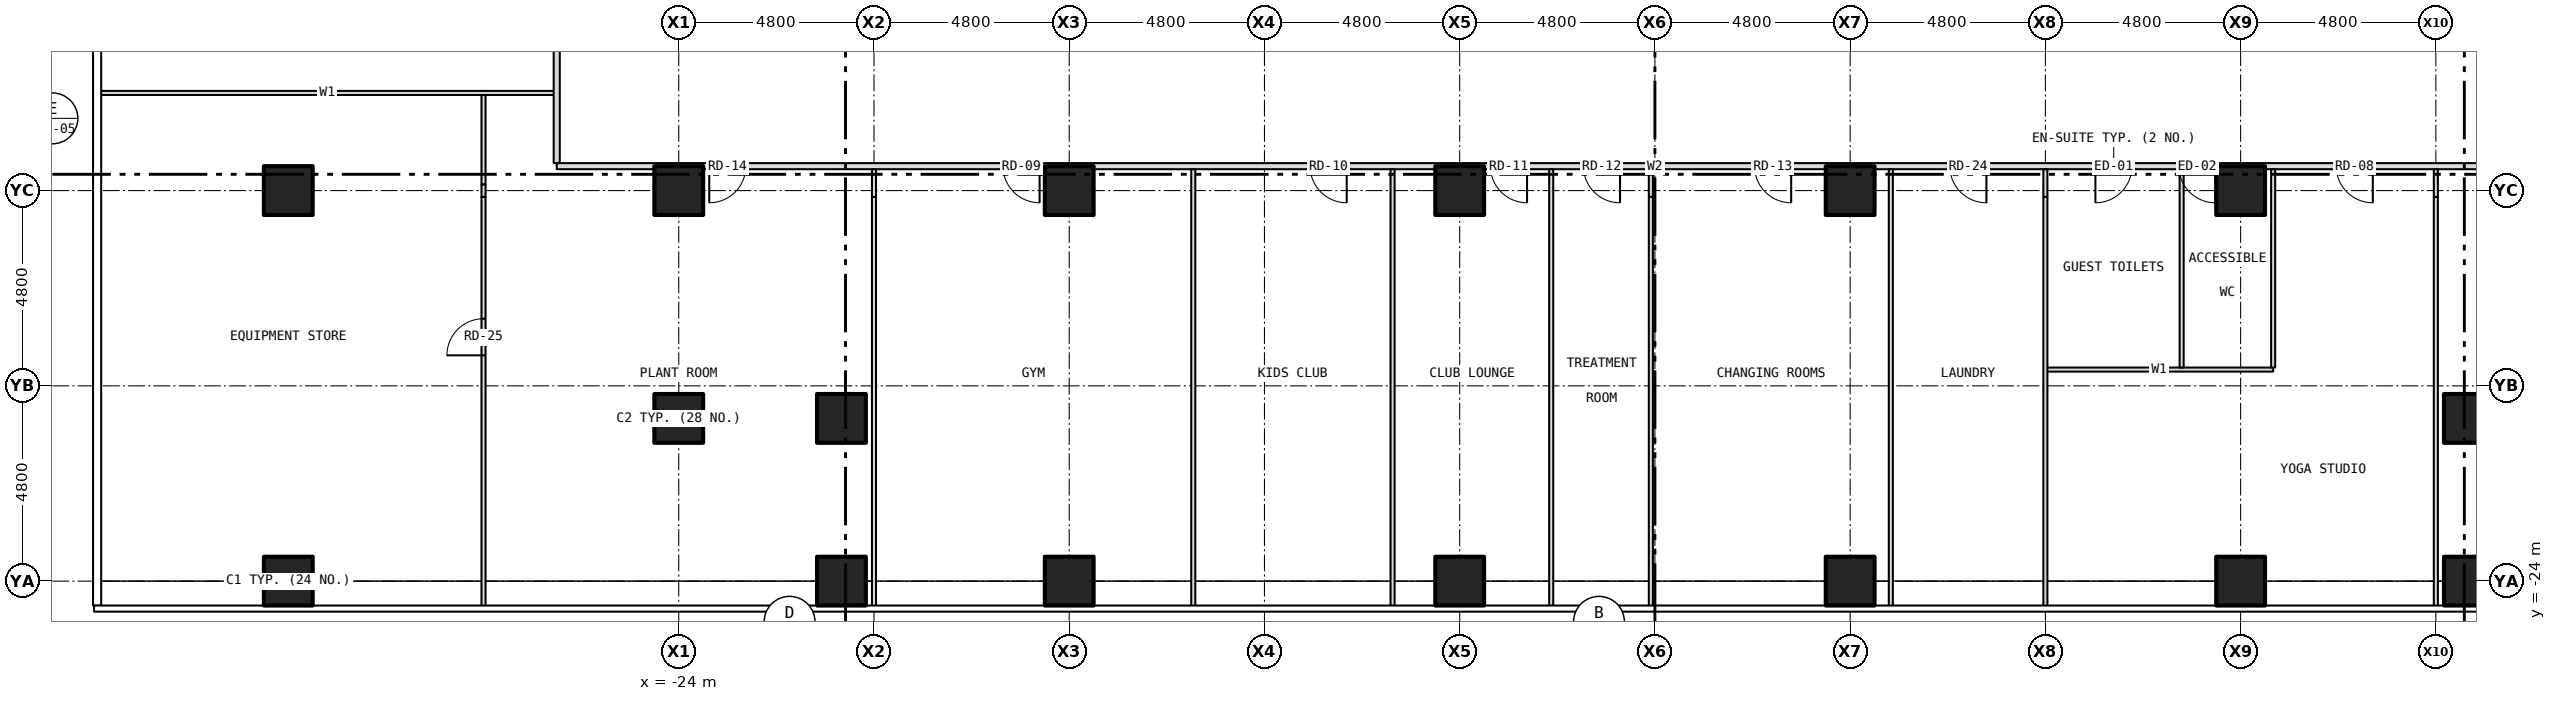
"""IFC4 building model, lengths in metres.
Left out: names, types, materials, properties, quantities, classifications, styles, units other than length and angle.
Written with IfcOpenShell. Run it as: python <this file> out.ifc"""

import sys

from ifc_helpers import new_model, si_unit, direction, frame, frame_2d, origin, origin_2d, place, context, subcontext, project, spatial, rectangle, hollow_rectangle, extrude, element, fill, save


model = new_model("IFC4")
c1 = context("Model", 3, precision=1e-05, world=origin(), true_north=direction((0.0, 1.0)))
c2 = subcontext(c1, "Body", "Model", "MODEL_VIEW")
j1 = project(units=[si_unit("LENGTHUNIT", "METRE"), si_unit("PLANEANGLEUNIT", "RADIAN")], contexts=[c1])
p1 = place(None, origin())
s1 = spatial("IfcSite", under=j1, at=p1, CompositionType="ELEMENT")
p2 = place(p1, origin())
s2 = spatial("IfcBuilding", under=s1, at=p2, CompositionType="ELEMENT")
p3 = place(p2, frame((0.0, 0.0, 24.5)))
s3 = spatial("IfcBuildingStorey", under=s2, at=p3, CompositionType="ELEMENT", Elevation=24.5)
for number, where, z_axis, x_axis in (
    (1, (-33.6, -24.0, -0.2), (0.0, 0.0, 1.0), (1.0, 0.0, 0.0)),
    (2, (-33.6, -14.4, -0.2), (0.0, 0.0, 1.0), (1.0, 0.0, 0.0)),
    (3, (-20.0, -24.0, -0.2), (0.0, 0.0, 1.0), (1.0, 0.0, 0.0)),
    (4, (-14.4, -24.0, -0.2), (0.0, 0.0, 1.0), (1.0, 0.0, 0.0)),
    (5, (-4.8, -24.0, -0.2), (0.0, 0.0, 1.0), (1.0, 0.0, 0.0)),
    (6, (4.8, -24.0, -0.2), (0.0, 0.0, 1.0), (1.0, 0.0, 0.0)),
    (7, (14.4, -24.0, -0.2), (0.0, 0.0, 1.0), (1.0, 0.0, 0.0)),
    (8, (20.0, -24.0, -0.2), (0.0, 0.0, 1.0), (1.0, 0.0, 0.0)),
    (9, (-24.0, -20.0, -0.2), (0.0, 0.0, 1.0), (1.0, 0.0, 0.0)),
    (10, (-24.0, -14.4, -0.2), (0.0, 0.0, 1.0), (1.0, 0.0, 0.0)),
    (11, (-20.0, -20.0, -0.2), (0.0, 0.0, 1.0), (1.0, 0.0, 0.0)),
    (12, (-14.4, -14.4, -0.2), (0.0, 0.0, 1.0), (1.0, 0.0, 0.0)),
    (13, (-4.8, -14.4, -0.2), (0.0, 0.0, 1.0), (1.0, 0.0, 0.0)),
    (14, (4.8, -14.4, -0.2), (0.0, 0.0, 1.0), (1.0, 0.0, 0.0)),
    (15, (14.4, -14.4, -0.2), (0.0, 0.0, 1.0), (1.0, 0.0, 0.0)),
    (16, (20.0, -20.0, -0.2), (0.0, 0.0, 1.0), (1.0, 0.0, 0.0)),
):
    element("IfcColumn", number, at=place(p3, frame(where, z_axis=z_axis, x_axis=x_axis)), inside=s3, PredefinedType="COLUMN", context=c2, shape_type="SweptSolid", body=[
        extrude(hollow_rectangle(XDim=1.2, YDim=1.2, WallThickness=0.07, at=origin_2d()), origin(), (0.0, 0.0, 1.0), 4.5),
    ])
p4 = place(p3, frame((9.6, -18.8, 0.0), z_axis=(0.0, 0.0, 1.0), x_axis=(1.0, 0.0, 0.0)))
e17 = element("IfcWall", 17, at=p4, inside=s3, PredefinedType="PARTITIONING", context=c2, shape_type="SweptSolid", body=[
    extrude(rectangle(XDim=5.6, YDim=0.1, at=frame_2d((2.8, 0.0))), origin(), (0.0, 0.0, 1.0), 4.3),
])
p5 = place(p3, frame((-27.0, -13.8, 0.0), z_axis=(0.0, 0.0, 1.0), x_axis=(1.0, 0.0, 0.0)))
e18 = element("IfcWall", 18, at=p5, inside=s3, PredefinedType="PARTITIONING", context=c2, shape_type="SweptSolid", body=[
    extrude(rectangle(XDim=54.0, YDim=0.15, at=frame_2d((27.0, 0.0))), origin(), (0.0, 0.0, 1.0), 4.3),
])
p6 = place(p5, frame((37.83, 0.0, 0.0)))
e19 = element("IfcOpeningElement", 19, at=p6, cuts=e18, PredefinedType="OPENING", context=c2, shape_type="SweptSolid", body=[
    extrude(rectangle(XDim=0.9, YDim=2.1, at=frame_2d((0.45, 1.05))), frame((0.0, 0.087, 0.0), z_axis=(0.0, -1.0, 0.0), x_axis=(1.0, 0.0, 0.0)), (0.0, 0.0, 1.0), 0.174),
])
p7 = place(p5, frame((39.88, 0.0, 0.0)))
e20 = element("IfcOpeningElement", 20, at=p7, cuts=e18, PredefinedType="OPENING", context=c2, shape_type="SweptSolid", body=[
    extrude(rectangle(XDim=0.9, YDim=2.1, at=frame_2d((0.45, 1.05))), frame((0.0, 0.087, 0.0), z_axis=(0.0, -1.0, 0.0), x_axis=(1.0, 0.0, 0.0)), (0.0, 0.0, 1.0), 0.174),
])
p8 = place(p5, frame((43.75, 0.0, 0.0)))
e21 = element("IfcOpeningElement", 21, at=p8, cuts=e18, PredefinedType="OPENING", context=c2, shape_type="SweptSolid", body=[
    extrude(rectangle(XDim=0.9, YDim=2.1, at=frame_2d((0.45, 1.05))), frame((0.0, 0.087, 0.0), z_axis=(0.0, -1.0, 0.0), x_axis=(1.0, 0.0, 0.0)), (0.0, 0.0, 1.0), 0.174),
])
p9 = place(p5, frame((10.972, 0.0, 0.0)))
e22 = element("IfcOpeningElement", 22, at=p9, cuts=e18, PredefinedType="OPENING", context=c2, shape_type="SweptSolid", body=[
    extrude(rectangle(XDim=0.9, YDim=2.1, at=frame_2d((0.45, 1.05))), frame((0.0, 0.087, 0.0), z_axis=(0.0, -1.0, 0.0), x_axis=(1.0, 0.0, 0.0)), (0.0, 0.0, 1.0), 0.174),
])
p10 = place(p5, frame((18.523, 0.0, 0.0)))
e23 = element("IfcOpeningElement", 23, at=p10, cuts=e18, PredefinedType="OPENING", context=c2, shape_type="SweptSolid", body=[
    extrude(rectangle(XDim=0.9, YDim=2.1, at=frame_2d((0.45, 1.05))), frame((0.0, 0.087, 0.0), z_axis=(0.0, -1.0, 0.0), x_axis=(1.0, 0.0, 0.0)), (0.0, 0.0, 1.0), 0.174),
])
p11 = place(p5, frame((22.956, 0.0, 0.0)))
e24 = element("IfcOpeningElement", 24, at=p11, cuts=e18, PredefinedType="OPENING", context=c2, shape_type="SweptSolid", body=[
    extrude(rectangle(XDim=0.9, YDim=2.1, at=frame_2d((0.45, 1.05))), frame((0.0, 0.087, 0.0), z_axis=(0.0, -1.0, 0.0), x_axis=(1.0, 0.0, 0.0)), (0.0, 0.0, 1.0), 0.174),
])
p12 = place(p5, frame((25.242, 0.0, 0.0)))
e25 = element("IfcOpeningElement", 25, at=p12, cuts=e18, PredefinedType="OPENING", context=c2, shape_type="SweptSolid", body=[
    extrude(rectangle(XDim=0.9, YDim=2.1, at=frame_2d((0.45, 1.05))), frame((0.0, 0.087, 0.0), z_axis=(0.0, -1.0, 0.0), x_axis=(1.0, 0.0, 0.0)), (0.0, 0.0, 1.0), 0.174),
])
p13 = place(p5, frame((29.45, 0.0, 0.0)))
e26 = element("IfcOpeningElement", 26, at=p13, cuts=e18, PredefinedType="OPENING", context=c2, shape_type="SweptSolid", body=[
    extrude(rectangle(XDim=0.9, YDim=2.1, at=frame_2d((0.45, 1.05))), frame((0.0, 0.087, 0.0), z_axis=(0.0, -1.0, 0.0), x_axis=(1.0, 0.0, 0.0)), (0.0, 0.0, 1.0), 0.174),
])
p14 = place(p5, frame((3.75, 0.0, 0.0)))
e27 = element("IfcOpeningElement", 27, at=p14, cuts=e18, PredefinedType="OPENING", context=c2, shape_type="SweptSolid", body=[
    extrude(rectangle(XDim=0.9, YDim=2.1, at=frame_2d((0.45, 1.05))), frame((0.0, 0.087, 0.0), z_axis=(0.0, -1.0, 0.0), x_axis=(1.0, 0.0, 0.0)), (0.0, 0.0, 1.0), 0.174),
])
p15 = place(p5, frame((49.35, 0.0, 0.0)))
e28 = element("IfcOpeningElement", 28, at=p15, cuts=e18, PredefinedType="OPENING", context=c2, shape_type="SweptSolid", body=[
    extrude(rectangle(XDim=0.9, YDim=2.1, at=frame_2d((0.45, 1.05))), frame((0.0, 0.087, 0.0), z_axis=(0.0, -1.0, 0.0), x_axis=(1.0, 0.0, 0.0)), (0.0, 0.0, 1.0), 0.174),
])
p16 = place(p5, frame((34.25, 0.0, 0.0)))
e29 = element("IfcOpeningElement", 29, at=p16, cuts=e18, PredefinedType="OPENING", context=c2, shape_type="SweptSolid", body=[
    extrude(rectangle(XDim=0.9, YDim=2.1, at=frame_2d((0.45, 1.05))), frame((0.0, 0.087, 0.0), z_axis=(0.0, -1.0, 0.0), x_axis=(1.0, 0.0, 0.0)), (0.0, 0.0, 1.0), 0.174),
])
p17 = place(p3, frame((-38.28, -12.0, 0.0), z_axis=(0.0, 0.0, 1.0), x_axis=(1.0, 0.0, 0.0)))
e30 = element("IfcWall", 30, at=p17, inside=s3, PredefinedType="PARTITIONING", context=c2, shape_type="SweptSolid", body=[
    extrude(rectangle(XDim=11.28, YDim=0.1, at=frame_2d((5.64, 0.0))), origin(), (0.0, 0.0, 1.0), 4.3),
])
p18 = place(p3, frame((-28.8, -24.63, 0.0), z_axis=(0.0, 0.0, 1.0), x_axis=(0.0, 1.0, 0.0)))
e31 = element("IfcWall", 31, at=p18, inside=s3, PredefinedType="PARTITIONING", context=c2, shape_type="SweptSolid", body=[
    extrude(rectangle(XDim=10.076, YDim=0.1, at=frame_2d((5.038, 0.0))), origin(), (0.0, 0.0, 1.0), 3.683),
])
p19 = place(p18, frame((6.18, 0.0, 0.0)))
e32 = element("IfcOpeningElement", 32, at=p19, cuts=e31, PredefinedType="OPENING", context=c2, shape_type="SweptSolid", body=[
    extrude(rectangle(XDim=0.9, YDim=2.1, at=frame_2d((0.45, 1.05))), frame((0.0, 0.062, 0.0), z_axis=(0.0, -1.0, 0.0), x_axis=(1.0, 0.0, 0.0)), (0.0, 0.0, 1.0), 0.124),
])
p20 = place(p3, frame((-28.8, -14.554, 0.0), z_axis=(0.0, 0.0, 1.0), x_axis=(0.0, 1.0, 0.0)))
e33 = element("IfcWall", 33, at=p20, inside=s3, PredefinedType="PARTITIONING", context=c2, shape_type="SweptSolid", body=[
    extrude(rectangle(XDim=0.308, YDim=0.1, at=frame_2d((0.154, 0.0))), origin(), (0.0, 0.0, 1.0), 4.3),
])
p21 = place(p3, frame((-28.8, -14.246, 0.0), z_axis=(0.0, 0.0, 1.0), x_axis=(0.0, 1.0, 0.0)))
e34 = element("IfcWall", 34, at=p21, inside=s3, PredefinedType="PARTITIONING", context=c2, shape_type="SweptSolid", body=[
    extrude(rectangle(XDim=2.196, YDim=0.1, at=frame_2d((1.098, 0.0))), origin(), (0.0, 0.0, 1.0), 3.683),
])
p22 = place(p3, frame((-27.0, -13.725, 0.0), z_axis=(0.0, 0.0, 1.0), x_axis=(0.0, 1.0, 0.0)))
e35 = element("IfcWall", 35, at=p22, inside=s3, PredefinedType="PARTITIONING", context=c2, shape_type="SweptSolid", body=[
    extrude(rectangle(XDim=27.45, YDim=0.15, at=frame_2d((13.725, 0.0))), origin(), (0.0, 0.0, 1.0), 4.3),
])
p23 = place(p22, frame((7.275, 0.0, 0.0)))
e36 = element("IfcOpeningElement", 36, at=p23, cuts=e35, PredefinedType="OPENING", context=c2, shape_type="SweptSolid", body=[
    extrude(rectangle(XDim=0.9, YDim=2.1, at=frame_2d((0.45, 1.05))), frame((0.0, 0.087, 0.0), z_axis=(0.0, -1.0, 0.0), x_axis=(1.0, 0.0, 0.0)), (0.0, 0.0, 1.0), 0.174),
])
p24 = place(p22, frame((19.275, 0.0, 0.0)))
e37 = element("IfcOpeningElement", 37, at=p24, cuts=e35, PredefinedType="OPENING", context=c2, shape_type="SweptSolid", body=[
    extrude(rectangle(XDim=0.9, YDim=2.1, at=frame_2d((0.45, 1.05))), frame((0.0, 0.087, 0.0), z_axis=(0.0, -1.0, 0.0), x_axis=(1.0, 0.0, 0.0)), (0.0, 0.0, 1.0), 0.174),
])
p25 = place(p3, frame((-19.2, -24.63, 0.0), z_axis=(0.0, 0.0, 1.0), x_axis=(0.0, 1.0, 0.0)))
e38 = element("IfcWall", 38, at=p25, inside=s3, PredefinedType="PARTITIONING", context=c2, shape_type="SweptSolid", body=[
    extrude(rectangle(XDim=10.076, YDim=0.1, at=frame_2d((5.038, 0.0))), origin(), (0.0, 0.0, 1.0), 3.683),
])
p26 = place(p3, frame((-19.2, -14.554, 0.0), z_axis=(0.0, 0.0, 1.0), x_axis=(0.0, 1.0, 0.0)))
e39 = element("IfcWall", 39, at=p26, inside=s3, PredefinedType="PARTITIONING", context=c2, shape_type="SweptSolid", body=[
    extrude(rectangle(XDim=0.679, YDim=0.1, at=frame_2d((0.339, 0.0))), origin(), (0.0, 0.0, 1.0), 4.3),
])
for number, where, z_axis, x_axis in (
    (40, (-11.35, -24.63, 0.0), (0.0, 0.0, 1.0), (0.0, 1.0, 0.0)),
    (41, (-6.45, -24.63, 0.0), (0.0, 0.0, 1.0), (0.0, 1.0, 0.0)),
    (42, (-2.55, -24.63, 0.0), (0.0, 0.0, 1.0), (0.0, 1.0, 0.0)),
):
    element("IfcWall", number, at=place(p3, frame(where, z_axis=z_axis, x_axis=x_axis)), inside=s3, PredefinedType="PARTITIONING", context=c2, shape_type="SweptSolid", body=[
        extrude(rectangle(XDim=10.755, YDim=0.1, at=frame_2d((5.377, 0.0))), origin(), (0.0, 0.0, 1.0), 4.3),
    ])
p27 = place(p3, frame((-0.1, -24.63, 0.0), z_axis=(0.0, 0.0, 1.0), x_axis=(0.0, 1.0, 0.0)))
e43 = element("IfcWall", 43, at=p27, inside=s3, PredefinedType="PARTITIONING", context=c2, shape_type="SweptSolid", body=[
    extrude(rectangle(XDim=10.076, YDim=0.1, at=frame_2d((5.038, 0.0))), origin(), (0.0, 0.0, 1.0), 3.683),
])
p28 = place(p3, frame((-0.1, -14.554, 0.0), z_axis=(0.0, 0.0, 1.0), x_axis=(0.0, 1.0, 0.0)))
e44 = element("IfcWall", 44, at=p28, inside=s3, PredefinedType="PARTITIONING", context=c2, shape_type="SweptSolid", body=[
    extrude(rectangle(XDim=0.679, YDim=0.1, at=frame_2d((0.339, 0.0))), origin(), (0.0, 0.0, 1.0), 4.3),
])
p29 = place(p3, frame((5.8, -24.63, 0.0), z_axis=(0.0, 0.0, 1.0), x_axis=(0.0, 1.0, 0.0)))
e45 = element("IfcWall", 45, at=p29, inside=s3, PredefinedType="PARTITIONING", context=c2, shape_type="SweptSolid", body=[
    extrude(rectangle(XDim=10.755, YDim=0.1, at=frame_2d((5.377, 0.0))), origin(), (0.0, 0.0, 1.0), 4.3),
])
p30 = place(p3, frame((9.6, -24.63, 0.0), z_axis=(0.0, 0.0, 1.0), x_axis=(0.0, 1.0, 0.0)))
e46 = element("IfcWall", 46, at=p30, inside=s3, PredefinedType="PARTITIONING", context=c2, shape_type="SweptSolid", body=[
    extrude(rectangle(XDim=10.076, YDim=0.1, at=frame_2d((5.038, 0.0))), origin(), (0.0, 0.0, 1.0), 3.683),
])
p31 = place(p3, frame((9.6, -14.554, 0.0), z_axis=(0.0, 0.0, 1.0), x_axis=(0.0, 1.0, 0.0)))
e47 = element("IfcWall", 47, at=p31, inside=s3, PredefinedType="PARTITIONING", context=c2, shape_type="SweptSolid", body=[
    extrude(rectangle(XDim=0.679, YDim=0.1, at=frame_2d((0.339, 0.0))), origin(), (0.0, 0.0, 1.0), 4.3),
])
for number, where, z_axis, x_axis in (
    (48, (12.95, -18.75, 0.0), (0.0, 0.0, 1.0), (0.0, 1.0, 0.0)),
    (49, (15.2, -18.75, 0.0), (0.0, 0.0, 1.0), (0.0, 1.0, 0.0)),
):
    element("IfcWall", number, at=place(p3, frame(where, z_axis=z_axis, x_axis=x_axis)), inside=s3, PredefinedType="PARTITIONING", context=c2, shape_type="SweptSolid", body=[
        extrude(rectangle(XDim=4.875, YDim=0.1, at=frame_2d((2.438, 0.0))), origin(), (0.0, 0.0, 1.0), 4.3),
    ])
p32 = place(p3, frame((19.2, -24.63, 0.0), z_axis=(0.0, 0.0, 1.0), x_axis=(0.0, 1.0, 0.0)))
e50 = element("IfcWall", 50, at=p32, inside=s3, PredefinedType="PARTITIONING", context=c2, shape_type="SweptSolid", body=[
    extrude(rectangle(XDim=10.076, YDim=0.1, at=frame_2d((5.038, 0.0))), origin(), (0.0, 0.0, 1.0), 3.683),
])
p33 = place(p3, frame((19.2, -14.554, 0.0), z_axis=(0.0, 0.0, 1.0), x_axis=(0.0, 1.0, 0.0)))
e51 = element("IfcWall", 51, at=p33, inside=s3, PredefinedType="PARTITIONING", context=c2, shape_type="SweptSolid", body=[
    extrude(rectangle(XDim=0.679, YDim=0.1, at=frame_2d((0.339, 0.0))), origin(), (0.0, 0.0, 1.0), 4.3),
])
p34 = place(p6, origin())
e52 = element("IfcDoor", 52, at=p34, inside=s3, OperationType="SINGLE_SWING_LEFT", PredefinedType="DOOR", context=c2, shape_type="SweptSolid", body=[
    extrude(rectangle(XDim=0.9, YDim=2.1, at=frame_2d((0.45, 1.05))), frame((0.0, 0.025, 0.0), z_axis=(0.0, -1.0, 0.0), x_axis=(1.0, 0.0, 0.0)), (0.0, 0.0, 1.0), 0.05),
])
fill(e19, e52)
p35 = place(p7, origin())
e53 = element("IfcDoor", 53, at=p35, inside=s3, OperationType="SINGLE_SWING_RIGHT", PredefinedType="DOOR", context=c2, shape_type="SweptSolid", body=[
    extrude(rectangle(XDim=0.9, YDim=2.1, at=frame_2d((0.45, 1.05))), frame((0.0, 0.025, 0.0), z_axis=(0.0, -1.0, 0.0), x_axis=(1.0, 0.0, 0.0)), (0.0, 0.0, 1.0), 0.05),
])
fill(e20, e53)
p36 = place(p8, origin())
e54 = element("IfcDoor", 54, at=p36, inside=s3, OperationType="SINGLE_SWING_RIGHT", PredefinedType="DOOR", context=c2, shape_type="SweptSolid", body=[
    extrude(rectangle(XDim=0.9, YDim=2.1, at=frame_2d((0.45, 1.05))), frame((0.0, 0.025, 0.0), z_axis=(0.0, -1.0, 0.0), x_axis=(1.0, 0.0, 0.0)), (0.0, 0.0, 1.0), 0.05),
])
fill(e21, e54)
p37 = place(p9, origin())
e55 = element("IfcDoor", 55, at=p37, inside=s3, OperationType="SINGLE_SWING_RIGHT", PredefinedType="DOOR", context=c2, shape_type="SweptSolid", body=[
    extrude(rectangle(XDim=0.9, YDim=2.1, at=frame_2d((0.45, 1.05))), frame((0.0, 0.025, 0.0), z_axis=(0.0, -1.0, 0.0), x_axis=(1.0, 0.0, 0.0)), (0.0, 0.0, 1.0), 0.05),
])
fill(e22, e55)
p38 = place(p10, origin())
e56 = element("IfcDoor", 56, at=p38, inside=s3, OperationType="SINGLE_SWING_RIGHT", PredefinedType="DOOR", context=c2, shape_type="SweptSolid", body=[
    extrude(rectangle(XDim=0.9, YDim=2.1, at=frame_2d((0.45, 1.05))), frame((0.0, 0.025, 0.0), z_axis=(0.0, -1.0, 0.0), x_axis=(1.0, 0.0, 0.0)), (0.0, 0.0, 1.0), 0.05),
])
fill(e23, e56)
p39 = place(p11, origin())
e57 = element("IfcDoor", 57, at=p39, inside=s3, OperationType="SINGLE_SWING_RIGHT", PredefinedType="DOOR", context=c2, shape_type="SweptSolid", body=[
    extrude(rectangle(XDim=0.9, YDim=2.1, at=frame_2d((0.45, 1.05))), frame((0.0, 0.025, 0.0), z_axis=(0.0, -1.0, 0.0), x_axis=(1.0, 0.0, 0.0)), (0.0, 0.0, 1.0), 0.05),
])
fill(e24, e57)
p40 = place(p12, origin())
e58 = element("IfcDoor", 58, at=p40, inside=s3, OperationType="SINGLE_SWING_RIGHT", PredefinedType="DOOR", context=c2, shape_type="SweptSolid", body=[
    extrude(rectangle(XDim=0.9, YDim=2.1, at=frame_2d((0.45, 1.05))), frame((0.0, 0.025, 0.0), z_axis=(0.0, -1.0, 0.0), x_axis=(1.0, 0.0, 0.0)), (0.0, 0.0, 1.0), 0.05),
])
fill(e25, e58)
p41 = place(p13, origin())
e59 = element("IfcDoor", 59, at=p41, inside=s3, OperationType="SINGLE_SWING_RIGHT", PredefinedType="DOOR", context=c2, shape_type="SweptSolid", body=[
    extrude(rectangle(XDim=0.9, YDim=2.1, at=frame_2d((0.45, 1.05))), frame((0.0, 0.025, 0.0), z_axis=(0.0, -1.0, 0.0), x_axis=(1.0, 0.0, 0.0)), (0.0, 0.0, 1.0), 0.05),
])
fill(e26, e59)
p42 = place(p14, origin())
e60 = element("IfcDoor", 60, at=p42, inside=s3, OperationType="SINGLE_SWING_LEFT", PredefinedType="DOOR", context=c2, shape_type="SweptSolid", body=[
    extrude(rectangle(XDim=0.9, YDim=2.1, at=frame_2d((0.45, 1.05))), frame((0.0, 0.025, 0.0), z_axis=(0.0, -1.0, 0.0), x_axis=(1.0, 0.0, 0.0)), (0.0, 0.0, 1.0), 0.05),
])
fill(e27, e60)
p43 = place(p16, origin())
e61 = element("IfcDoor", 61, at=p43, inside=s3, OperationType="SINGLE_SWING_RIGHT", PredefinedType="DOOR", context=c2, shape_type="SweptSolid", body=[
    extrude(rectangle(XDim=0.9, YDim=2.1, at=frame_2d((0.45, 1.05))), frame((0.0, 0.025, 0.0), z_axis=(0.0, -1.0, 0.0), x_axis=(1.0, 0.0, 0.0)), (0.0, 0.0, 1.0), 0.05),
])
fill(e29, e61)
p44 = place(p19, origin())
e62 = element("IfcDoor", 62, at=p44, inside=s3, OperationType="SINGLE_SWING_LEFT", PredefinedType="DOOR", context=c2, shape_type="SweptSolid", body=[
    extrude(rectangle(XDim=0.9, YDim=2.1, at=frame_2d((0.45, 1.05))), frame((0.0, 0.025, 0.0), z_axis=(0.0, -1.0, 0.0), x_axis=(1.0, 0.0, 0.0)), (0.0, 0.0, 1.0), 0.05),
])
fill(e32, e62)
save(model, sys.argv[1])
